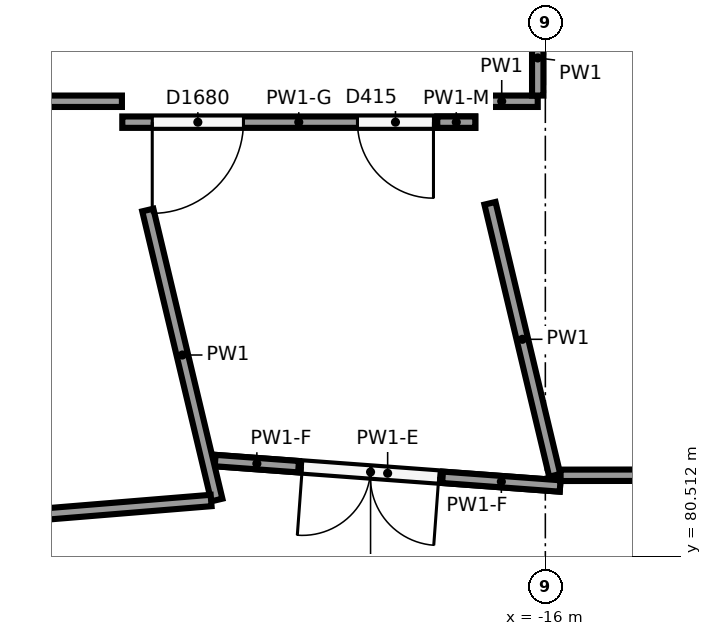
"""IFC4 building model, lengths in metres.
Left out: names, types, materials, properties, quantities, classifications, styles, units other than length and angle.
Written with IfcOpenShell. Run it as: python <this file> out.ifc"""

import sys

from ifc_helpers import new_model, si_unit, direction, frame, frame_2d, origin, origin_2d, place, context, subcontext, project, spatial, rectangle, circle, extrude, element, fill, save


model = new_model("IFC4")
c1 = context("Model", 3, precision=1e-05, world=origin(), true_north=direction((0.0, 1.0)))
c2 = subcontext(c1, "Body", "Model", "MODEL_VIEW")
j1 = project(units=[si_unit("LENGTHUNIT", "METRE"), si_unit("PLANEANGLEUNIT", "RADIAN")], contexts=[c1])
p1 = place(None, origin())
s1 = spatial("IfcSite", under=j1, at=p1, CompositionType="ELEMENT")
p2 = place(p1, origin())
s2 = spatial("IfcBuilding", under=s1, at=p2, CompositionType="ELEMENT")
p3 = place(p2, origin())
s3 = spatial("IfcBuildingStorey", under=s2, at=p3, CompositionType="ELEMENT", Elevation=0.0)
p4 = place(p3, frame((-19.119, 85.698, 0.0), z_axis=(0.0, 0.0, 1.0), x_axis=(1.0, 0.0, 0.0)))
e1 = element("IfcColumn", 1, at=p4, inside=s3, PredefinedType="COLUMN", context=c2, shape_type="SweptSolid", body=[
    extrude(circle(Radius=0.4, at=origin_2d()), origin(), (0.0, 0.0, 1.0), 6.5),
])
p5 = place(p3, frame((-15.876, 81.579, 0.0), z_axis=(0.0, 0.0, 1.0), x_axis=(-0.231653421041, 0.972798382256, 0.0)))
e2 = element("IfcWall", 2, at=p5, inside=s3, PredefinedType="PARTITIONING", context=c2, shape_type="SweptSolid", body=[
    extrude(rectangle(XDim=3.679, YDim=0.15, at=frame_2d((1.84, 0.0))), origin(), (0.0, 0.0, 1.0), 6.15),
])
p6 = place(p3, frame((-17.048, 86.5, 0.0), z_axis=(0.0, 0.0, 1.0), x_axis=(1.0, 0.0, 0.0)))
e3 = element("IfcWall", 3, at=p6, inside=s3, PredefinedType="PARTITIONING", context=c2, shape_type="SweptSolid", body=[
    extrude(rectangle(XDim=0.948, YDim=0.15, at=frame_2d((0.474, 0.0))), origin(), (0.0, 0.0, 1.0), 6.15),
])
p7 = place(p3, frame((-16.1, 86.575, 0.0), z_axis=(0.0, 0.0, 1.0), x_axis=(0.0, 1.0, 0.0)))
e4 = element("IfcWall", 4, at=p7, inside=s3, PredefinedType="PARTITIONING", context=c2, shape_type="SweptSolid", body=[
    extrude(rectangle(XDim=0.989, YDim=0.15, at=frame_2d((0.495, 0.0))), origin(), (0.0, 0.0, 1.0), 6.15),
])
p8 = place(p3, frame((-6.538, 81.59, 0.0), z_axis=(0.0, 0.0, 1.0), x_axis=(-0.99999932727, -0.001159939114, 0.0)))
e5 = element("IfcWall", 5, at=p8, inside=s3, PredefinedType="PARTITIONING", context=c2, shape_type="SweptSolid", body=[
    extrude(rectangle(XDim=9.261, YDim=0.15, at=frame_2d((4.63, 0.0))), origin(), (0.0, 0.0, 1.0), 6.15),
])
p9 = place(p3, frame((-29.825, 86.5, 0.0), z_axis=(0.0, 0.0, 1.0), x_axis=(1.0, 0.0, 0.0)))
e6 = element("IfcWall", 6, at=p9, inside=s3, PredefinedType="PARTITIONING", context=c2, shape_type="SweptSolid", body=[
    extrude(rectangle(XDim=8.254, YDim=0.15, at=frame_2d((4.127, 0.0))), origin(), (0.0, 0.0, 1.0), 6.15),
])
p10 = place(p3, frame((-21.23, 85.069, 0.0), z_axis=(0.0, 0.0, 1.0), x_axis=(0.231637359188, -0.972802206941, 0.0)))
e7 = element("IfcWall", 7, at=p10, inside=s3, PredefinedType="PARTITIONING", context=c2, shape_type="SweptSolid", body=[
    extrude(rectangle(XDim=3.922, YDim=0.15, at=frame_2d((1.961, 0.0))), origin(), (0.0, 0.0, 1.0), 6.15),
])
p11 = place(p3, frame((-20.398, 81.248, 0.0), z_axis=(0.0, 0.0, 1.0), x_axis=(-0.99666312122, -0.081624890812, 0.0)))
e8 = element("IfcWall", 8, at=p11, inside=s3, PredefinedType="PARTITIONING", context=c2, shape_type="SweptSolid", body=[
    extrude(rectangle(XDim=7.155, YDim=0.15, at=frame_2d((3.577, 0.0))), origin(), (0.0, 0.0, 1.0), 6.15),
])
p12 = place(p11, frame((3.2, 0.0, 0.0)))
e9 = element("IfcOpeningElement", 9, at=p12, cuts=e8, PredefinedType="OPENING", context=c2, shape_type="SweptSolid", body=[
    extrude(rectangle(XDim=1.0, YDim=2.1, at=frame_2d((0.5, 1.05))), frame((0.0, 0.085, 0.0), z_axis=(0.0, -1.0, 0.0), x_axis=(1.0, 0.0, 0.0)), (0.0, 0.0, 1.0), 0.17),
])
p13 = place(p3, frame((-16.922, 86.225, 0.0), z_axis=(0.0, 0.0, 1.0), x_axis=(-1.0, 0.0, 0.0)))
e10 = element("IfcWall", 10, at=p13, inside=s3, PredefinedType="PARTITIONING", context=c2, shape_type="SweptSolid", body=[
    extrude(rectangle(XDim=4.644, YDim=0.15, at=frame_2d((2.322, 0.0))), origin(), (0.0, 0.0, 1.0), 5.4),
])
p14 = place(p13, frame((0.55, 0.0, 0.0)))
e11 = element("IfcOpeningElement", 11, at=p14, cuts=e10, PredefinedType="OPENING", context=c2, shape_type="SweptSolid", body=[
    extrude(rectangle(XDim=1.0, YDim=2.1, at=frame_2d((0.5, 1.05))), frame((0.0, 0.085, 0.0), z_axis=(0.0, -1.0, 0.0), x_axis=(1.0, 0.0, 0.0)), (0.0, 0.0, 1.0), 0.17),
])
p15 = place(p13, frame((3.05, 0.0, 0.0)))
e12 = element("IfcOpeningElement", 12, at=p15, cuts=e10, PredefinedType="OPENING", context=c2, shape_type="SweptSolid", body=[
    extrude(rectangle(XDim=1.2, YDim=2.1, at=frame_2d((0.6, 1.05))), frame((0.0, 0.085, 0.0), z_axis=(0.0, -1.0, 0.0), x_axis=(1.0, 0.0, 0.0)), (0.0, 0.0, 1.0), 0.17),
])
p16 = place(p3, frame((-16.922, 86.225, 5.4), z_axis=(0.0, 0.0, 1.0), x_axis=(-1.0, 0.0, 0.0)))
e13 = element("IfcWall", 13, at=p16, inside=s3, PredefinedType="PARTITIONING", context=c2, shape_type="SweptSolid", body=[
    extrude(rectangle(XDim=0.5, YDim=0.15, at=frame_2d((0.25, 0.0))), origin(), (0.0, 0.0, 1.0), 0.75),
])
p17 = place(p3, frame((-15.806, 81.439, 0.0), z_axis=(0.0, 0.0, 1.0), x_axis=(-0.99729913664, 0.073446797464, 0.0)))
e14 = element("IfcWall", 14, at=p17, inside=s3, PredefinedType="PARTITIONING", context=c2, shape_type="SweptSolid", body=[
    extrude(rectangle(XDim=4.551, YDim=0.15, at=frame_2d((2.275, 0.0))), origin(), (0.0, 0.0, 1.0), 5.25),
])
p18 = place(p17, frame((1.601, 0.0, 0.0)))
e15 = element("IfcOpeningElement", 15, at=p18, cuts=e14, PredefinedType="OPENING", context=c2, shape_type="SweptSolid", body=[
    extrude(rectangle(XDim=1.8, YDim=2.1, at=frame_2d((0.9, 1.05))), frame((0.0, 0.085, 0.0), z_axis=(0.0, -1.0, 0.0), x_axis=(1.0, 0.0, 0.0)), (0.0, 0.0, 1.0), 0.17),
])
p19 = place(p3, frame((-19.247, 81.692, 5.25), z_axis=(0.0, 0.0, 1.0), x_axis=(-0.997297350325, 0.073471048956, 0.0)))
e16 = element("IfcWall", 16, at=p19, inside=s3, PredefinedType="PARTITIONING", context=c2, shape_type="SweptSolid", body=[
    extrude(rectangle(XDim=1.1, YDim=0.15, at=frame_2d((0.55, 0.0))), origin(), (0.0, 0.0, 1.0), 0.9),
])
p20 = place(p3, frame((-15.806, 81.439, 5.25), z_axis=(0.0, 0.0, 1.0), x_axis=(-0.997305423763, 0.07336137766, 0.0)))
e17 = element("IfcWall", 17, at=p20, inside=s3, PredefinedType="PARTITIONING", context=c2, shape_type="SweptSolid", body=[
    extrude(rectangle(XDim=1.551, YDim=0.15, at=frame_2d((0.775, 0.0))), origin(), (0.0, 0.0, 1.0), 0.9),
])
p21 = place(p14, origin())
e18 = element("IfcDoor", 18, at=p21, inside=s3, OperationType="SINGLE_SWING_LEFT", PredefinedType="DOOR", context=c2, shape_type="SweptSolid", body=[
    extrude(rectangle(XDim=1.0, YDim=2.1, at=frame_2d((0.5, 1.05))), frame((0.0, 0.025, 0.0), z_axis=(0.0, -1.0, 0.0), x_axis=(1.0, 0.0, 0.0)), (0.0, 0.0, 1.0), 0.05),
])
fill(e11, e18)
p22 = place(p15, origin())
e19 = element("IfcDoor", 19, at=p22, inside=s3, OperationType="SINGLE_SWING_RIGHT", PredefinedType="DOOR", context=c2, shape_type="SweptSolid", body=[
    extrude(rectangle(XDim=1.2, YDim=2.1, at=frame_2d((0.6, 1.05))), frame((0.0, 0.025, 0.0), z_axis=(0.0, -1.0, 0.0), x_axis=(1.0, 0.0, 0.0)), (0.0, 0.0, 1.0), 0.05),
])
fill(e12, e19)
p23 = place(p18, origin())
e20 = element("IfcDoor", 20, at=p23, inside=s3, OperationType="DOUBLE_DOOR_SINGLE_SWING", PredefinedType="DOOR", context=c2, shape_type="SweptSolid", body=[
    extrude(rectangle(XDim=1.8, YDim=2.1, at=frame_2d((0.9, 1.05))), frame((0.0, 0.025, 0.0), z_axis=(0.0, -1.0, 0.0), x_axis=(1.0, 0.0, 0.0)), (0.0, 0.0, 1.0), 0.05),
])
fill(e15, e20)
save(model, sys.argv[1])
